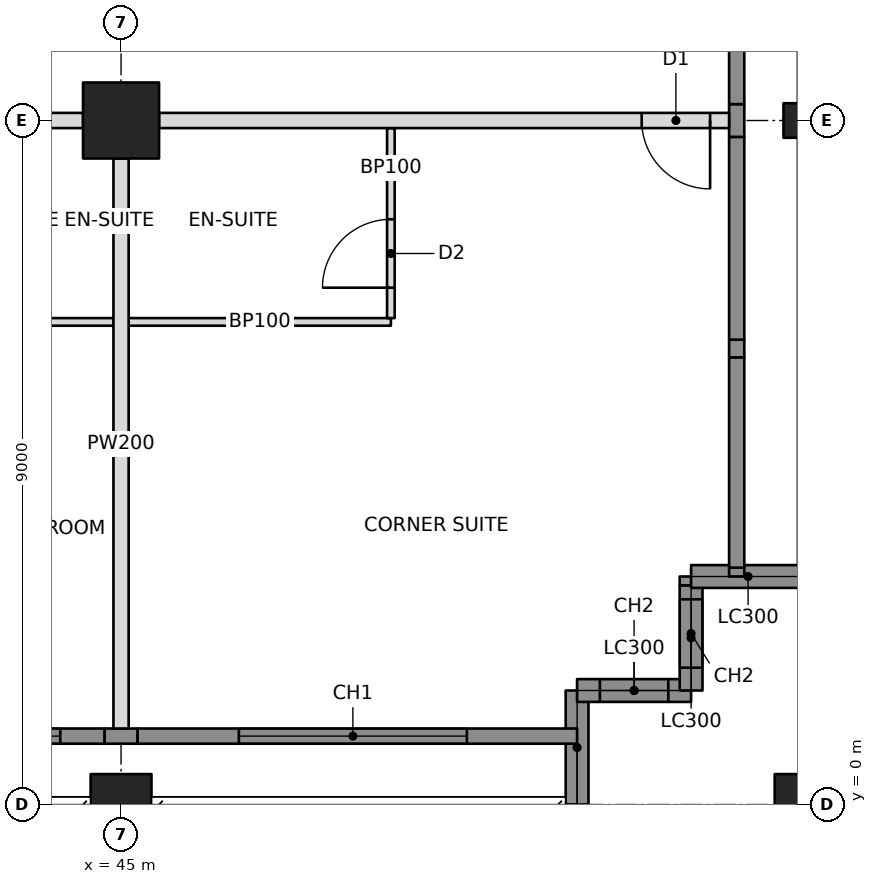
"""IFC4 building model, lengths in metres.
Left out: names, types, materials, properties, quantities, classifications, styles, units other than length and angle.
Written with IfcOpenShell. Run it as: python <this file> out.ifc"""

import sys

from ifc_helpers import new_model, si_unit, direction, frame, frame_2d, origin, origin_2d, place, context, subcontext, project, spatial, rectangle, hollow_rectangle, i_section, extrude, element, fill, save


model = new_model("IFC4")
c1 = context("Model", 3, precision=1e-05, world=origin(), true_north=direction((0.0, 1.0)))
c2 = subcontext(c1, "Body", "Model", "MODEL_VIEW")
j1 = project(units=[si_unit("LENGTHUNIT", "METRE"), si_unit("PLANEANGLEUNIT", "RADIAN")], contexts=[c1])
p1 = place(None, origin())
s1 = spatial("IfcSite", under=j1, at=p1, CompositionType="ELEMENT")
p2 = place(p1, origin())
s2 = spatial("IfcBuilding", under=s1, at=p2, CompositionType="ELEMENT")
p3 = place(p2, frame((0.0, 0.0, 85.8)))
s3 = spatial("IfcBuildingStorey", under=s2, at=p3, CompositionType="ELEMENT", Elevation=85.8)
p4 = place(p3, frame((45.0, 0.0, 0.0), z_axis=(0.0, 0.0, 1.0), x_axis=(1.0, 0.0, 0.0)))
e1 = element("IfcColumn", 1, at=p4, inside=s3, PredefinedType="COLUMN", context=c2, shape_type="SweptSolid", body=[
    extrude(hollow_rectangle(XDim=0.8, YDim=0.8, WallThickness=0.07, at=origin_2d()), origin(), (0.0, 0.0, 1.0), 3.4),
])
p5 = place(p3, frame((45.0, 9.0, 0.0), z_axis=(0.0, 0.0, 1.0), x_axis=(0.0, 1.0, 0.0)))
e2 = element("IfcColumn", 2, at=p5, inside=s3, PredefinedType="COLUMN", context=c2, shape_type="SweptSolid", body=[
    extrude(hollow_rectangle(XDim=1.0, YDim=1.0, WallThickness=0.1, at=origin_2d()), origin(), (0.0, 0.0, 1.0), 3.4),
])
p6 = place(p3, frame((54.0, 0.0, 0.0), z_axis=(0.0, 0.0, 1.0), x_axis=(1.0, 0.0, 0.0)))
e3 = element("IfcColumn", 3, at=p6, inside=s3, PredefinedType="COLUMN", context=c2, shape_type="SweptSolid", body=[
    extrude(hollow_rectangle(XDim=0.8, YDim=0.8, WallThickness=0.07, at=origin_2d()), origin(), (0.0, 0.0, 1.0), 3.4),
])
p7 = place(p3, frame((54.0, 9.0, 0.0), z_axis=(0.0, 0.0, 1.0), x_axis=(0.0, 1.0, 0.0)))
e4 = element("IfcColumn", 4, at=p7, inside=s3, PredefinedType="COLUMN", context=c2, shape_type="SweptSolid", body=[
    extrude(i_section(OverallWidth=0.455, OverallDepth=0.569, WebThickness=0.078, FlangeThickness=0.125, at=origin_2d()), origin(), (0.0, 0.0, 1.0), 3.4),
])
p8 = place(p3, frame((51.0, 0.0, 0.0), z_axis=(0.0, 0.0, 1.0), x_axis=(0.0, 1.0, 0.0)))
e5 = element("IfcWall", 5, at=p8, inside=s3, PredefinedType="SOLIDWALL", context=c2, shape_type="SweptSolid", body=[
    extrude(rectangle(XDim=1.5, YDim=0.3, at=frame_2d((0.75, 0.0))), origin(), (0.0, 0.0, 1.0), 2.202),
])
p9 = place(p3, frame((51.0, 1.5, 0.0), z_axis=(0.0, 0.0, 1.0), x_axis=(1.0, 0.0, 0.0)))
e6 = element("IfcWall", 6, at=p9, inside=s3, PredefinedType="SOLIDWALL", context=c2, shape_type="SweptSolid", body=[
    extrude(rectangle(XDim=1.5, YDim=0.3, at=frame_2d((0.75, 0.0))), origin(), (0.0, 0.0, 1.0), 3.15),
])
p10 = place(p9, frame((0.3, 0.0, 0.6)))
e7 = element("IfcOpeningElement", 7, at=p10, cuts=e6, PredefinedType="OPENING", context=c2, shape_type="SweptSolid", body=[
    extrude(rectangle(XDim=0.9, YDim=2.2, at=frame_2d((0.45, 1.1))), frame((0.0, 0.16, 0.0), z_axis=(0.0, -1.0, 0.0), x_axis=(1.0, 0.0, 0.0)), (0.0, 0.0, 1.0), 0.32),
])
p11 = place(p3, frame((52.5, 1.5, 0.0), z_axis=(0.0, 0.0, 1.0), x_axis=(0.0, 1.0, 0.0)))
e8 = element("IfcWall", 8, at=p11, inside=s3, PredefinedType="SOLIDWALL", context=c2, shape_type="SweptSolid", body=[
    extrude(rectangle(XDim=1.384, YDim=0.3, at=frame_2d((0.692, 0.0))), origin(), (0.0, 0.0, 1.0), 3.15),
])
p12 = place(p11, frame((0.3, 0.0, 0.6)))
e9 = element("IfcOpeningElement", 9, at=p12, cuts=e8, PredefinedType="OPENING", context=c2, shape_type="SweptSolid", body=[
    extrude(rectangle(XDim=0.9, YDim=2.2, at=frame_2d((0.45, 1.1))), frame((0.0, 0.16, 0.0), z_axis=(0.0, -1.0, 0.0), x_axis=(1.0, 0.0, 0.0)), (0.0, 0.0, 1.0), 0.32),
])
p13 = place(p3, frame((52.5, 3.0, 0.0), z_axis=(0.0, 0.0, 1.0), x_axis=(1.0, 0.0, 0.0)))
e10 = element("IfcWall", 10, at=p13, inside=s3, PredefinedType="SOLIDWALL", context=c2, shape_type="SweptSolid", body=[
    extrude(rectangle(XDim=1.5, YDim=0.3, at=frame_2d((0.75, 0.0))), origin(), (0.0, 0.0, 1.0), 2.202),
])
p14 = place(p3, frame((53.1, 3.0, 0.0), z_axis=(0.0, 0.0, 1.0), x_axis=(0.0, 1.0, 0.0)))
e11 = element("IfcWall", 11, at=p14, inside=s3, PredefinedType="SOLIDWALL", context=c2, shape_type="SweptSolid", body=[
    extrude(rectangle(XDim=0.116, YDim=0.2, at=frame_2d((0.058, 0.0))), origin(), (0.0, 0.0, 1.0), 2.542),
])
p15 = place(p3, frame((36.5, 9.0, 0.0), z_axis=(0.0, 0.0, 1.0), x_axis=(1.0, 0.0, 0.0)))
e12 = element("IfcWall", 12, at=p15, inside=s3, PredefinedType="PARTITIONING", context=c2, shape_type="SweptSolid", body=[
    extrude(rectangle(XDim=8.0, YDim=0.2, at=frame_2d((4.0, 0.0))), origin(), (0.0, 0.0, 1.0), 2.21),
])
p16 = place(p15, frame((2.85, 0.0, 0.0)))
e13 = element("IfcOpeningElement", 13, at=p16, cuts=e12, PredefinedType="OPENING", context=c2, shape_type="SweptSolid", body=[
    extrude(rectangle(XDim=0.9, YDim=2.1, at=frame_2d((0.45, 1.05))), frame((0.0, 0.11, 0.0), z_axis=(0.0, -1.0, 0.0), x_axis=(1.0, 0.0, 0.0)), (0.0, 0.0, 1.0), 0.22),
])
p17 = place(p15, frame((4.25, 0.0, 0.0)))
e14 = element("IfcOpeningElement", 14, at=p17, cuts=e12, PredefinedType="OPENING", context=c2, shape_type="SweptSolid", body=[
    extrude(rectangle(XDim=0.9, YDim=2.1, at=frame_2d((0.45, 1.05))), frame((0.0, 0.11, 0.0), z_axis=(0.0, -1.0, 0.0), x_axis=(1.0, 0.0, 0.0)), (0.0, 0.0, 1.0), 0.22),
])
p18 = place(p3, frame((45.5, 9.0, 0.0), z_axis=(0.0, 0.0, 1.0), x_axis=(1.0, 0.0, 0.0)))
e15 = element("IfcWall", 15, at=p18, inside=s3, PredefinedType="PARTITIONING", context=c2, shape_type="SweptSolid", body=[
    extrude(rectangle(XDim=7.5, YDim=0.2, at=frame_2d((3.75, 0.0))), origin(), (0.0, 0.0, 1.0), 2.21),
])
p19 = place(p18, frame((6.35, 0.0, 0.0)))
e16 = element("IfcOpeningElement", 16, at=p19, cuts=e15, PredefinedType="OPENING", context=c2, shape_type="SweptSolid", body=[
    extrude(rectangle(XDim=0.9, YDim=2.1, at=frame_2d((0.45, 1.05))), frame((0.0, 0.11, 0.0), z_axis=(0.0, -1.0, 0.0), x_axis=(1.0, 0.0, 0.0)), (0.0, 0.0, 1.0), 0.22),
])
p20 = place(p3, frame((45.0, 8.5, 0.0), z_axis=(0.0, 0.0, 1.0), x_axis=(0.0, -1.0, 0.0)))
e17 = element("IfcWall", 17, at=p20, inside=s3, PredefinedType="PARTITIONING", context=c2, shape_type="SweptSolid", body=[
    extrude(rectangle(XDim=7.5, YDim=0.2, at=frame_2d((3.75, 0.0))), origin(), (0.0, 0.0, 1.0), 2.21),
])
p21 = place(p3, frame((41.95, 6.35, 0.0), z_axis=(0.0, 0.0, 1.0), x_axis=(1.0, 0.0, 0.0)))
e18 = element("IfcWall", 18, at=p21, inside=s3, PredefinedType="PARTITIONING", context=c2, shape_type="SweptSolid", body=[
    extrude(rectangle(XDim=2.95, YDim=0.1, at=frame_2d((1.475, 0.0))), origin(), (0.0, 0.0, 1.0), 2.21),
])
p22 = place(p3, frame((45.1, 6.35, 0.0), z_axis=(0.0, 0.0, 1.0), x_axis=(1.0, 0.0, 0.0)))
e19 = element("IfcWall", 19, at=p22, inside=s3, PredefinedType="PARTITIONING", context=c2, shape_type="SweptSolid", body=[
    extrude(rectangle(XDim=3.45, YDim=0.1, at=frame_2d((1.725, 0.0))), origin(), (0.0, 0.0, 1.0), 2.21),
])
p23 = place(p3, frame((48.55, 8.9, 0.0), z_axis=(0.0, 0.0, 1.0), x_axis=(0.0, -1.0, 0.0)))
e20 = element("IfcWall", 20, at=p23, inside=s3, PredefinedType="PARTITIONING", context=c2, shape_type="SweptSolid", body=[
    extrude(rectangle(XDim=2.5, YDim=0.1, at=frame_2d((1.25, 0.0))), origin(), (0.0, 0.0, 1.0), 2.21),
])
p24 = place(p23, frame((1.2, 0.0, 0.0)))
e21 = element("IfcOpeningElement", 21, at=p24, cuts=e20, PredefinedType="OPENING", context=c2, shape_type="SweptSolid", body=[
    extrude(rectangle(XDim=0.9, YDim=2.1, at=frame_2d((0.45, 1.05))), frame((0.0, 0.06, 0.0), z_axis=(0.0, -1.0, 0.0), x_axis=(1.0, 0.0, 0.0)), (0.0, 0.0, 1.0), 0.12),
])
p25 = place(p3, frame((52.5, 2.884, 0.0), z_axis=(0.0, 0.0, 1.0), x_axis=(0.0, 1.0, 0.0)))
e22 = element("IfcWall", 22, at=p25, inside=s3, PredefinedType="SOLIDWALL", context=c2, shape_type="SweptSolid", body=[
    extrude(rectangle(XDim=0.116, YDim=0.3, at=frame_2d((0.058, 0.0))), origin(), (0.0, 0.0, 1.0), 2.542),
])
p26 = place(p3, frame((36.215, 0.9, 0.0), z_axis=(0.0, 0.0, 1.0), x_axis=(1.0, 0.0, 0.0)))
e23 = element("IfcWall", 23, at=p26, inside=s3, PredefinedType="SOLIDWALL", context=c2, shape_type="SweptSolid", body=[
    extrude(rectangle(XDim=8.569, YDim=0.2, at=frame_2d((4.285, 0.0))), origin(), (0.0, 0.0, 1.0), 3.15),
])
p27 = place(p26, frame((0.585, 0.0, 0.6)))
e24 = element("IfcOpeningElement", 24, at=p27, cuts=e23, PredefinedType="OPENING", context=c2, shape_type="SweptSolid", body=[
    extrude(rectangle(XDim=3.0, YDim=2.2, at=frame_2d((1.5, 1.1))), frame((0.0, 0.11, 0.0), z_axis=(0.0, -1.0, 0.0), x_axis=(1.0, 0.0, 0.0)), (0.0, 0.0, 1.0), 0.22),
])
p28 = place(p26, frame((4.985, 0.0, 0.6)))
e25 = element("IfcOpeningElement", 25, at=p28, cuts=e23, PredefinedType="OPENING", context=c2, shape_type="SweptSolid", body=[
    extrude(rectangle(XDim=3.0, YDim=2.2, at=frame_2d((1.5, 1.1))), frame((0.0, 0.11, 0.0), z_axis=(0.0, -1.0, 0.0), x_axis=(1.0, 0.0, 0.0)), (0.0, 0.0, 1.0), 0.22),
])
p29 = place(p3, frame((44.785, 0.9, 0.0), z_axis=(0.0, 0.0, 1.0), x_axis=(1.0, 0.0, 0.0)))
e26 = element("IfcWall", 26, at=p29, inside=s3, PredefinedType="SOLIDWALL", context=c2, shape_type="SweptSolid", body=[
    extrude(rectangle(XDim=0.431, YDim=0.2, at=frame_2d((0.215, 0.0))), origin(), (0.0, 0.0, 1.0), 2.21),
])
p30 = place(p3, frame((45.215, 0.9, 0.0), z_axis=(0.0, 0.0, 1.0), x_axis=(1.0, 0.0, 0.0)))
e27 = element("IfcWall", 27, at=p30, inside=s3, PredefinedType="SOLIDWALL", context=c2, shape_type="SweptSolid", body=[
    extrude(rectangle(XDim=5.785, YDim=0.2, at=frame_2d((2.892, 0.0))), origin(), (0.0, 0.0, 1.0), 3.15),
])
p31 = place(p30, frame((1.335, 0.0, 0.6)))
e28 = element("IfcOpeningElement", 28, at=p31, cuts=e27, PredefinedType="OPENING", context=c2, shape_type="SweptSolid", body=[
    extrude(rectangle(XDim=3.0, YDim=2.2, at=frame_2d((1.5, 1.1))), frame((0.0, 0.11, 0.0), z_axis=(0.0, -1.0, 0.0), x_axis=(1.0, 0.0, 0.0)), (0.0, 0.0, 1.0), 0.22),
])
p32 = place(p3, frame((53.1, 3.116, 0.0), z_axis=(0.0, 0.0, 1.0), x_axis=(0.0, 1.0, 0.0)))
e29 = element("IfcWall", 29, at=p32, inside=s3, PredefinedType="SOLIDWALL", context=c2, shape_type="SweptSolid", body=[
    extrude(rectangle(XDim=2.768, YDim=0.2, at=frame_2d((1.384, 0.0))), origin(), (0.0, 0.0, 1.0), 3.15),
])
p33 = place(p3, frame((53.1, 5.884, 0.0), z_axis=(0.0, 0.0, 1.0), x_axis=(0.0, 1.0, 0.0)))
e30 = element("IfcWall", 30, at=p33, inside=s3, PredefinedType="SOLIDWALL", context=c2, shape_type="SweptSolid", body=[
    extrude(rectangle(XDim=0.232, YDim=0.2, at=frame_2d((0.116, 0.0))), origin(), (0.0, 0.0, 1.0), 2.542),
])
p34 = place(p3, frame((53.1, 6.116, 0.0), z_axis=(0.0, 0.0, 1.0), x_axis=(0.0, 1.0, 0.0)))
e31 = element("IfcWall", 31, at=p34, inside=s3, PredefinedType="SOLIDWALL", context=c2, shape_type="SweptSolid", body=[
    extrude(rectangle(XDim=2.668, YDim=0.2, at=frame_2d((1.334, 0.0))), origin(), (0.0, 0.0, 1.0), 3.15),
])
p35 = place(p3, frame((53.1, 8.785, 0.0), z_axis=(0.0, 0.0, 1.0), x_axis=(0.0, 1.0, 0.0)))
e32 = element("IfcWall", 32, at=p35, inside=s3, PredefinedType="SOLIDWALL", context=c2, shape_type="SweptSolid", body=[
    extrude(rectangle(XDim=0.431, YDim=0.2, at=frame_2d((0.215, 0.0))), origin(), (0.0, 0.0, 1.0), 2.21),
])
p36 = place(p3, frame((53.1, 9.215, 0.0), z_axis=(0.0, 0.0, 1.0), x_axis=(0.0, 1.0, 0.0)))
e33 = element("IfcWall", 33, at=p36, inside=s3, PredefinedType="SOLIDWALL", context=c2, shape_type="SweptSolid", body=[
    extrude(rectangle(XDim=8.571, YDim=0.2, at=frame_2d((4.285, 0.0))), origin(), (0.0, 0.0, 1.0), 3.15),
])
p37 = place(p36, frame((1.935, 0.0, 0.6)))
e34 = element("IfcOpeningElement", 34, at=p37, cuts=e33, PredefinedType="OPENING", context=c2, shape_type="SweptSolid", body=[
    extrude(rectangle(XDim=3.0, YDim=2.2, at=frame_2d((1.5, 1.1))), frame((0.0, 0.11, 0.0), z_axis=(0.0, -1.0, 0.0), x_axis=(1.0, 0.0, 0.0)), (0.0, 0.0, 1.0), 0.22),
])
p38 = place(p36, frame((5.435, 0.0, 0.6)))
e35 = element("IfcOpeningElement", 35, at=p38, cuts=e33, PredefinedType="OPENING", context=c2, shape_type="SweptSolid", body=[
    extrude(rectangle(XDim=3.0, YDim=2.2, at=frame_2d((1.5, 1.1))), frame((0.0, 0.11, 0.0), z_axis=(0.0, -1.0, 0.0), x_axis=(1.0, 0.0, 0.0)), (0.0, 0.0, 1.0), 0.22),
])
p39 = place(p10, origin())
e36 = element("IfcWindow", 36, at=p39, inside=s3, PartitioningType="SINGLE_PANEL", PredefinedType="WINDOW", context=c2, shape_type="SweptSolid", body=[
    extrude(rectangle(XDim=0.9, YDim=2.2, at=frame_2d((0.45, 1.1))), frame((0.0, 0.03, 0.0), z_axis=(0.0, -1.0, 0.0), x_axis=(1.0, 0.0, 0.0)), (0.0, 0.0, 1.0), 0.06),
])
fill(e7, e36)
p40 = place(p12, origin())
e37 = element("IfcWindow", 37, at=p40, inside=s3, PartitioningType="SINGLE_PANEL", PredefinedType="WINDOW", context=c2, shape_type="SweptSolid", body=[
    extrude(rectangle(XDim=0.9, YDim=2.2, at=frame_2d((0.45, 1.1))), frame((0.0, 0.03, 0.0), z_axis=(0.0, -1.0, 0.0), x_axis=(1.0, 0.0, 0.0)), (0.0, 0.0, 1.0), 0.06),
])
fill(e9, e37)
p41 = place(p28, origin())
e38 = element("IfcWindow", 38, at=p41, inside=s3, PartitioningType="TRIPLE_PANEL_VERTICAL", PredefinedType="WINDOW", context=c2, shape_type="SweptSolid", body=[
    extrude(rectangle(XDim=3.0, YDim=2.2, at=frame_2d((1.5, 1.1))), frame((0.0, 0.03, 0.0), z_axis=(0.0, -1.0, 0.0), x_axis=(1.0, 0.0, 0.0)), (0.0, 0.0, 1.0), 0.06),
])
fill(e25, e38)
p42 = place(p31, origin())
e39 = element("IfcWindow", 39, at=p42, inside=s3, PartitioningType="TRIPLE_PANEL_VERTICAL", PredefinedType="WINDOW", context=c2, shape_type="SweptSolid", body=[
    extrude(rectangle(XDim=3.0, YDim=2.2, at=frame_2d((1.5, 1.1))), frame((0.0, 0.03, 0.0), z_axis=(0.0, -1.0, 0.0), x_axis=(1.0, 0.0, 0.0)), (0.0, 0.0, 1.0), 0.06),
])
fill(e28, e39)
p43 = place(p24, frame((0.9, 0.0, 0.0), z_axis=(0.0, 0.0, 1.0), x_axis=(-1.0, 0.0, 0.0)))
e40 = element("IfcDoor", 40, at=p43, inside=s3, OperationType="SINGLE_SWING_LEFT", PredefinedType="DOOR", context=c2, shape_type="SweptSolid", body=[
    extrude(rectangle(XDim=0.9, YDim=2.1, at=frame_2d((0.45, 1.05))), frame((0.0, 0.025, 0.0), z_axis=(0.0, -1.0, 0.0), x_axis=(1.0, 0.0, 0.0)), (0.0, 0.0, 1.0), 0.05),
])
fill(e21, e40)
p44 = place(p19, frame((0.9, 0.0, 0.0), z_axis=(0.0, 0.0, 1.0), x_axis=(-1.0, 0.0, 0.0)))
e41 = element("IfcDoor", 41, at=p44, inside=s3, OperationType="SINGLE_SWING_LEFT", PredefinedType="DOOR", context=c2, shape_type="SweptSolid", body=[
    extrude(rectangle(XDim=0.9, YDim=2.1, at=frame_2d((0.45, 1.05))), frame((0.0, 0.025, 0.0), z_axis=(0.0, -1.0, 0.0), x_axis=(1.0, 0.0, 0.0)), (0.0, 0.0, 1.0), 0.05),
])
fill(e16, e41)
save(model, sys.argv[1])
